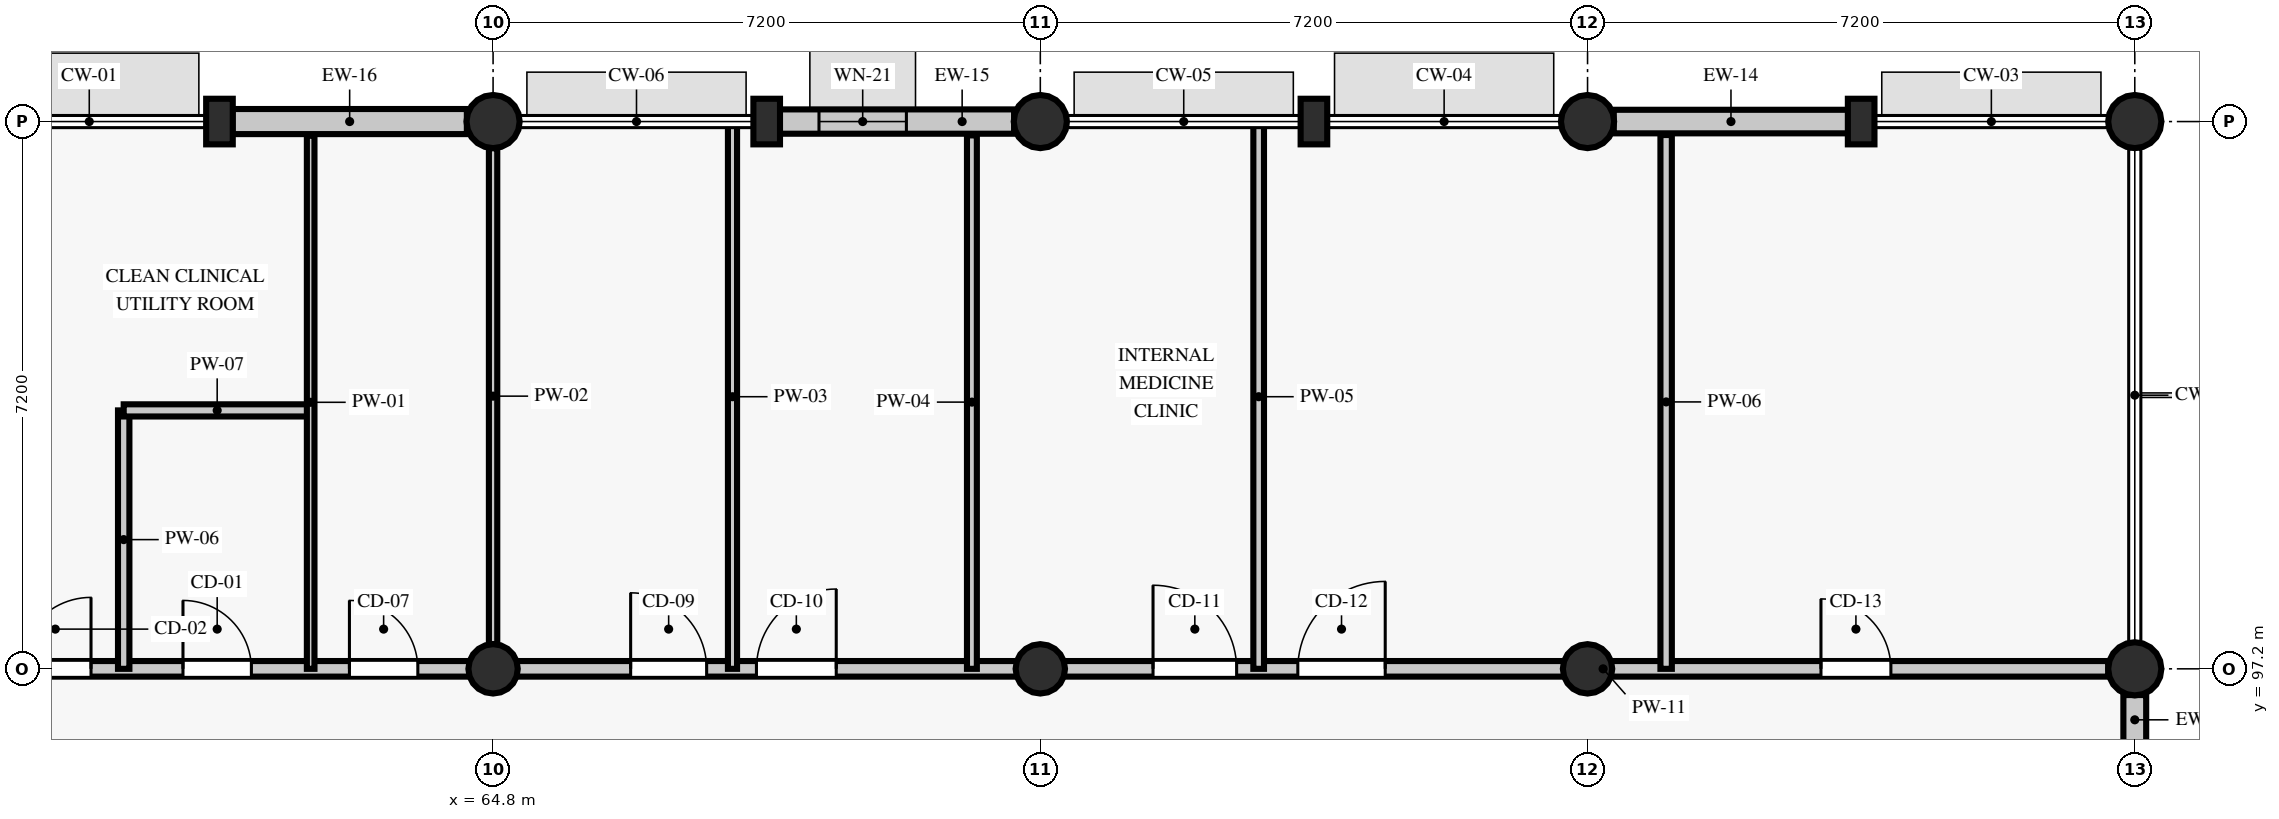
"""IFC4 building model, lengths in metres.
Left out: names, types, materials, properties, quantities, classifications, styles, units other than length and angle.
Written with IfcOpenShell. Run it as: python <this file> out.ifc"""

import sys

from ifc_helpers import new_model, si_unit, direction, frame, frame_2d, origin, origin_2d, place, context, subcontext, project, spatial, rectangle, circle, extrude, element, fill, save


model = new_model("IFC4")
c1 = context("Model", 3, precision=1e-05, world=origin(), true_north=direction((0.0, 1.0)))
c2 = subcontext(c1, "Body", "Model", "MODEL_VIEW")
j1 = project(units=[si_unit("LENGTHUNIT", "METRE"), si_unit("PLANEANGLEUNIT", "RADIAN")], contexts=[c1])
p1 = place(None, origin())
s1 = spatial("IfcSite", under=j1, at=p1, CompositionType="ELEMENT")
p2 = place(p1, origin())
s2 = spatial("IfcBuilding", under=s1, at=p2, CompositionType="ELEMENT")
p3 = place(p2, frame((0.0, 0.0, 4.8)))
s3 = spatial("IfcBuildingStorey", under=s2, at=p3, CompositionType="ELEMENT", Elevation=4.8)
p4 = place(p3, frame((64.8, 97.2, 0.0), z_axis=(0.0, 0.0, 1.0), x_axis=(1.0, 0.0, 0.0)))
e1 = element("IfcColumn", 1, at=p4, inside=s3, PredefinedType="COLUMN", context=c2, shape_type="SweptSolid", body=[
    extrude(circle(Radius=0.325, at=origin_2d()), origin(), (0.0, 0.0, 1.0), 4.555),
])
p5 = place(p3, frame((64.8, 104.4, 0.0), z_axis=(0.0, 0.0, 1.0), x_axis=(1.0, 0.0, 0.0)))
e2 = element("IfcColumn", 2, at=p5, inside=s3, PredefinedType="COLUMN", context=c2, shape_type="SweptSolid", body=[
    extrude(circle(Radius=0.35, at=origin_2d()), origin(), (0.0, 0.0, 1.0), 4.555),
])
p6 = place(p3, frame((72.0, 97.2, 0.0), z_axis=(0.0, 0.0, 1.0), x_axis=(1.0, 0.0, 0.0)))
e3 = element("IfcColumn", 3, at=p6, inside=s3, PredefinedType="COLUMN", context=c2, shape_type="SweptSolid", body=[
    extrude(circle(Radius=0.325, at=origin_2d()), origin(), (0.0, 0.0, 1.0), 4.555),
])
p7 = place(p3, frame((72.0, 104.4, 0.0), z_axis=(0.0, 0.0, 1.0), x_axis=(1.0, 0.0, 0.0)))
e4 = element("IfcColumn", 4, at=p7, inside=s3, PredefinedType="COLUMN", context=c2, shape_type="SweptSolid", body=[
    extrude(circle(Radius=0.35, at=origin_2d()), origin(), (0.0, 0.0, 1.0), 4.555),
])
p8 = place(p3, frame((79.2, 97.2, 0.0), z_axis=(0.0, 0.0, 1.0), x_axis=(1.0, 0.0, 0.0)))
e5 = element("IfcColumn", 5, at=p8, inside=s3, PredefinedType="COLUMN", context=c2, shape_type="SweptSolid", body=[
    extrude(circle(Radius=0.325, at=origin_2d()), origin(), (0.0, 0.0, 1.0), 4.555),
])
for number, where, z_axis, x_axis in (
    (6, (79.2, 104.4, 0.0), (0.0, 0.0, 1.0), (1.0, 0.0, 0.0)),
    (7, (86.4, 97.2, 0.0), (0.0, 0.0, 1.0), (1.0, 0.0, 0.0)),
    (8, (86.4, 104.4, 0.0), (0.0, 0.0, 1.0), (1.0, 0.0, 0.0)),
):
    element("IfcColumn", number, at=place(p3, frame(where, z_axis=z_axis, x_axis=x_axis)), inside=s3, PredefinedType="COLUMN", context=c2, shape_type="SweptSolid", body=[
        extrude(circle(Radius=0.35, at=origin_2d()), origin(), (0.0, 0.0, 1.0), 4.555),
    ])
for number, where, z_axis, x_axis in (
    (9, (61.2, 104.4, 0.0), (0.0, 0.0, 1.0), (1.0, 0.0, 0.0)),
    (10, (68.4, 104.4, 0.0), (0.0, 0.0, 1.0), (1.0, 0.0, 0.0)),
    (11, (75.6, 104.4, 0.0), (0.0, 0.0, 1.0), (1.0, 0.0, 0.0)),
    (12, (82.8, 104.4, 0.0), (0.0, 0.0, 1.0), (1.0, 0.0, 0.0)),
):
    element("IfcColumn", number, at=place(p3, frame(where, z_axis=z_axis, x_axis=x_axis)), inside=s3, PredefinedType="PILASTER", context=c2, shape_type="SweptSolid", body=[
        extrude(rectangle(XDim=0.35, YDim=0.6, at=origin_2d()), origin(), (0.0, 0.0, 1.0), 4.555),
    ])
p9 = place(p3, frame((86.4, 94.502, 0.0), z_axis=(0.0, 0.0, 1.0), x_axis=(0.0, 1.0, 0.0)))
e13 = element("IfcWall", 13, at=p9, inside=s3, PredefinedType="STANDARD", context=c2, shape_type="SweptSolid", body=[
    extrude(rectangle(XDim=2.353, YDim=0.3, at=frame_2d((1.177, 0.0))), origin(), (0.0, 0.0, 1.0), 4.555),
])
p10 = place(p9, frame((0.701, 0.0, 0.9)))
e14 = element("IfcOpeningElement", 14, at=p10, cuts=e13, PredefinedType="OPENING", context=c2, shape_type="SweptSolid", body=[
    extrude(rectangle(XDim=0.95, YDim=1.3, at=frame_2d((0.475, 0.65))), frame((0.0, 0.16, 0.0), z_axis=(0.0, -1.0, 0.0), x_axis=(1.0, 0.0, 0.0)), (0.0, 0.0, 1.0), 0.32),
])
p11 = place(p3, frame((82.629, 104.4, 0.0), z_axis=(0.0, 0.0, 1.0), x_axis=(-1.0, 0.0, 0.0)))
e15 = element("IfcWall", 15, at=p11, inside=s3, PredefinedType="STANDARD", context=c2, shape_type="SweptSolid", body=[
    extrude(rectangle(XDim=3.084, YDim=0.31, at=frame_2d((1.542, 0.0))), origin(), (0.0, 0.0, 1.0), 3.905),
])
p12 = place(p3, frame((71.655, 104.4, 0.0), z_axis=(0.0, 0.0, 1.0), x_axis=(-1.0, 0.0, 0.0)))
e16 = element("IfcWall", 16, at=p12, inside=s3, PredefinedType="STANDARD", context=c2, shape_type="SweptSolid", body=[
    extrude(rectangle(XDim=3.084, YDim=0.32, at=frame_2d((1.542, 0.0))), origin(), (0.0, 0.0, 1.0), 3.905),
])
p13 = place(p12, frame((1.417, 0.0, 0.9)))
e17 = element("IfcOpeningElement", 17, at=p13, cuts=e16, PredefinedType="OPENING", context=c2, shape_type="SweptSolid", body=[
    extrude(rectangle(XDim=1.15, YDim=1.54, at=frame_2d((0.575, 0.77))), frame((0.0, 0.17, 0.0), z_axis=(0.0, -1.0, 0.0), x_axis=(1.0, 0.0, 0.0)), (0.0, 0.0, 1.0), 0.34),
])
p14 = place(p3, frame((64.455, 104.4, 0.0), z_axis=(0.0, 0.0, 1.0), x_axis=(-1.0, 0.0, 0.0)))
e18 = element("IfcWall", 18, at=p14, inside=s3, PredefinedType="STANDARD", context=c2, shape_type="SweptSolid", body=[
    extrude(rectangle(XDim=3.084, YDim=0.33, at=frame_2d((1.542, 0.0))), origin(), (0.0, 0.0, 1.0), 3.905),
])
p15 = place(p3, frame((50.75, 97.2, 0.0), z_axis=(0.0, 0.0, 1.0), x_axis=(1.0, 0.0, 0.0)))
e19 = element("IfcWall", 19, at=p15, inside=s3, PredefinedType="PARTITIONING", context=c2, shape_type="SweptSolid", body=[
    extrude(rectangle(XDim=35.3, YDim=0.205, at=frame_2d((17.65, 0.0))), origin(), (0.0, 0.0, 1.0), 3.805),
])
p16 = place(p15, frame((2.763, 0.0, 0.0)))
e20 = element("IfcOpeningElement", 20, at=p16, cuts=e19, PredefinedType="OPENING", context=c2, shape_type="SweptSolid", body=[
    extrude(rectangle(XDim=1.06, YDim=2.08, at=frame_2d((0.53, 1.04))), frame((0.0, 0.113, 0.0), z_axis=(0.0, -1.0, 0.0), x_axis=(1.0, 0.0, 0.0)), (0.0, 0.0, 1.0), 0.225),
])
p17 = place(p15, frame((7.82, 0.0, 0.0)))
e21 = element("IfcOpeningElement", 21, at=p17, cuts=e19, PredefinedType="OPENING", context=c2, shape_type="SweptSolid", body=[
    extrude(rectangle(XDim=0.94, YDim=2.08, at=frame_2d((0.47, 1.04))), frame((0.0, 0.113, 0.0), z_axis=(0.0, -1.0, 0.0), x_axis=(1.0, 0.0, 0.0)), (0.0, 0.0, 1.0), 0.225),
])
p18 = place(p15, frame((9.97, 0.0, 0.0)))
e22 = element("IfcOpeningElement", 22, at=p18, cuts=e19, PredefinedType="OPENING", context=c2, shape_type="SweptSolid", body=[
    extrude(rectangle(XDim=0.9, YDim=2.08, at=frame_2d((0.45, 1.04))), frame((0.0, 0.113, 0.0), z_axis=(0.0, -1.0, 0.0), x_axis=(1.0, 0.0, 0.0)), (0.0, 0.0, 1.0), 0.225),
])
p19 = place(p15, frame((12.16, 0.0, 0.0)))
e23 = element("IfcOpeningElement", 23, at=p19, cuts=e19, PredefinedType="OPENING", context=c2, shape_type="SweptSolid", body=[
    extrude(rectangle(XDim=0.9, YDim=2.13, at=frame_2d((0.45, 1.065))), frame((0.0, 0.113, 0.0), z_axis=(0.0, -1.0, 0.0), x_axis=(1.0, 0.0, 0.0)), (0.0, 0.0, 1.0), 0.225),
])
p20 = place(p15, frame((15.86, 0.0, 0.0)))
e24 = element("IfcOpeningElement", 24, at=p20, cuts=e19, PredefinedType="OPENING", context=c2, shape_type="SweptSolid", body=[
    extrude(rectangle(XDim=1.0, YDim=2.13, at=frame_2d((0.5, 1.065))), frame((0.0, 0.113, 0.0), z_axis=(0.0, -1.0, 0.0), x_axis=(1.0, 0.0, 0.0)), (0.0, 0.0, 1.0), 0.225),
])
p21 = place(p15, frame((17.515, 0.0, 0.0)))
e25 = element("IfcOpeningElement", 25, at=p21, cuts=e19, PredefinedType="OPENING", context=c2, shape_type="SweptSolid", body=[
    extrude(rectangle(XDim=1.05, YDim=2.13, at=frame_2d((0.525, 1.065))), frame((0.0, 0.113, 0.0), z_axis=(0.0, -1.0, 0.0), x_axis=(1.0, 0.0, 0.0)), (0.0, 0.0, 1.0), 0.225),
])
p22 = place(p15, frame((22.733, 0.0, 0.0)))
e26 = element("IfcOpeningElement", 26, at=p22, cuts=e19, PredefinedType="OPENING", context=c2, shape_type="SweptSolid", body=[
    extrude(rectangle(XDim=1.1, YDim=2.13, at=frame_2d((0.55, 1.065))), frame((0.0, 0.113, 0.0), z_axis=(0.0, -1.0, 0.0), x_axis=(1.0, 0.0, 0.0)), (0.0, 0.0, 1.0), 0.225),
])
p23 = place(p15, frame((24.638, 0.0, 0.0)))
e27 = element("IfcOpeningElement", 27, at=p23, cuts=e19, PredefinedType="OPENING", context=c2, shape_type="SweptSolid", body=[
    extrude(rectangle(XDim=1.15, YDim=2.13, at=frame_2d((0.575, 1.065))), frame((0.0, 0.113, 0.0), z_axis=(0.0, -1.0, 0.0), x_axis=(1.0, 0.0, 0.0)), (0.0, 0.0, 1.0), 0.225),
])
p24 = place(p15, frame((31.521, 0.0, 0.0)))
e28 = element("IfcOpeningElement", 28, at=p24, cuts=e19, PredefinedType="OPENING", context=c2, shape_type="SweptSolid", body=[
    extrude(rectangle(XDim=0.92, YDim=2.18, at=frame_2d((0.46, 1.09))), frame((0.0, 0.113, 0.0), z_axis=(0.0, -1.0, 0.0), x_axis=(1.0, 0.0, 0.0)), (0.0, 0.0, 1.0), 0.225),
])
p25 = place(p3, frame((59.94, 97.2, 0.0), z_axis=(0.0, 0.0, 1.0), x_axis=(0.0, 1.0, 0.0)))
e29 = element("IfcWall", 29, at=p25, inside=s3, PredefinedType="PARTITIONING", context=c2, shape_type="SweptSolid", body=[
    extrude(rectangle(XDim=3.4, YDim=0.15, at=frame_2d((1.7, 0.0))), origin(), (0.0, 0.0, 1.0), 3.805),
])
p26 = place(p3, frame((59.94, 100.6, 0.0), z_axis=(0.0, 0.0, 1.0), x_axis=(1.0, 0.0, 0.0)))
e30 = element("IfcWall", 30, at=p26, inside=s3, PredefinedType="PARTITIONING", context=c2, shape_type="SweptSolid", body=[
    extrude(rectangle(XDim=2.46, YDim=0.16, at=frame_2d((1.23, 0.0))), origin(), (0.0, 0.0, 1.0), 4.055),
])
p27 = place(p3, frame((62.4, 97.2, 0.0), z_axis=(0.0, 0.0, 1.0), x_axis=(0.0, 1.0, 0.0)))
e31 = element("IfcWall", 31, at=p27, inside=s3, PredefinedType="PARTITIONING", context=c2, shape_type="SweptSolid", body=[
    extrude(rectangle(XDim=7.013, YDim=0.1, at=frame_2d((3.506, 0.0))), origin(), (0.0, 0.0, 1.0), 3.805),
])
p28 = place(p3, frame((64.8, 97.525, 0.0), z_axis=(0.0, 0.0, 1.0), x_axis=(0.0, 1.0, 0.0)))
e32 = element("IfcWall", 32, at=p28, inside=s3, PredefinedType="PARTITIONING", context=c2, shape_type="SweptSolid", body=[
    extrude(rectangle(XDim=6.525, YDim=0.11, at=frame_2d((3.263, 0.0))), origin(), (0.0, 0.0, 1.0), 4.005),
])
p29 = place(p3, frame((67.95, 97.2, 0.0), z_axis=(0.0, 0.0, 1.0), x_axis=(0.0, 1.0, 0.0)))
e33 = element("IfcWall", 33, at=p29, inside=s3, PredefinedType="PARTITIONING", context=c2, shape_type="SweptSolid", body=[
    extrude(rectangle(XDim=7.16, YDim=0.12, at=frame_2d((3.58, 0.0))), origin(), (0.0, 0.0, 1.0), 3.805),
])
p30 = place(p3, frame((71.1, 97.2, 0.0), z_axis=(0.0, 0.0, 1.0), x_axis=(0.0, 1.0, 0.0)))
e34 = element("IfcWall", 34, at=p30, inside=s3, PredefinedType="PARTITIONING", context=c2, shape_type="SweptSolid", body=[
    extrude(rectangle(XDim=7.018, YDim=0.13, at=frame_2d((3.509, 0.0))), origin(), (0.0, 0.0, 1.0), 3.805),
])
p31 = place(p3, frame((74.873, 97.2, 0.0), z_axis=(0.0, 0.0, 1.0), x_axis=(0.0, 1.0, 0.0)))
e35 = element("IfcWall", 35, at=p31, inside=s3, PredefinedType="PARTITIONING", context=c2, shape_type="SweptSolid", body=[
    extrude(rectangle(XDim=7.16, YDim=0.14, at=frame_2d((3.58, 0.0))), origin(), (0.0, 0.0, 1.0), 3.805),
])
p32 = place(p3, frame((80.234, 97.2, 0.0), z_axis=(0.0, 0.0, 1.0), x_axis=(0.0, 1.0, 0.0)))
e36 = element("IfcWall", 36, at=p32, inside=s3, PredefinedType="PARTITIONING", context=c2, shape_type="SweptSolid", body=[
    extrude(rectangle(XDim=7.023, YDim=0.15, at=frame_2d((3.511, 0.0))), origin(), (0.0, 0.0, 1.0), 3.805),
])
p33 = place(p13, origin())
e37 = element("IfcWindow", 37, at=p33, inside=s3, PartitioningType="SINGLE_PANEL", PredefinedType="WINDOW", context=c2, shape_type="SweptSolid", body=[
    extrude(rectangle(XDim=1.15, YDim=1.54, at=frame_2d((0.575, 0.77))), frame((0.0, 0.03, 0.0), z_axis=(0.0, -1.0, 0.0), x_axis=(1.0, 0.0, 0.0)), (0.0, 0.0, 1.0), 0.06),
])
fill(e17, e37)
p34 = place(p17, origin())
e38 = element("IfcDoor", 38, at=p34, inside=s3, OperationType="SINGLE_SWING_RIGHT", PredefinedType="DOOR", context=c2, shape_type="SweptSolid", body=[
    extrude(rectangle(XDim=0.94, YDim=2.08, at=frame_2d((0.47, 1.04))), frame((0.0, 0.025, 0.0), z_axis=(0.0, -1.0, 0.0), x_axis=(1.0, 0.0, 0.0)), (0.0, 0.0, 1.0), 0.05),
])
fill(e21, e38)
p35 = place(p18, origin())
e39 = element("IfcDoor", 39, at=p35, inside=s3, OperationType="SINGLE_SWING_LEFT", PredefinedType="DOOR", context=c2, shape_type="SweptSolid", body=[
    extrude(rectangle(XDim=0.9, YDim=2.08, at=frame_2d((0.45, 1.04))), frame((0.0, 0.025, 0.0), z_axis=(0.0, -1.0, 0.0), x_axis=(1.0, 0.0, 0.0)), (0.0, 0.0, 1.0), 0.05),
])
fill(e22, e39)
p36 = place(p19, origin())
e40 = element("IfcDoor", 40, at=p36, inside=s3, OperationType="SINGLE_SWING_LEFT", PredefinedType="DOOR", context=c2, shape_type="SweptSolid", body=[
    extrude(rectangle(XDim=0.9, YDim=2.13, at=frame_2d((0.45, 1.065))), frame((0.0, 0.025, 0.0), z_axis=(0.0, -1.0, 0.0), x_axis=(1.0, 0.0, 0.0)), (0.0, 0.0, 1.0), 0.05),
])
fill(e23, e40)
p37 = place(p20, origin())
e41 = element("IfcDoor", 41, at=p37, inside=s3, OperationType="SINGLE_SWING_LEFT", PredefinedType="DOOR", context=c2, shape_type="SweptSolid", body=[
    extrude(rectangle(XDim=1.0, YDim=2.13, at=frame_2d((0.5, 1.065))), frame((0.0, 0.025, 0.0), z_axis=(0.0, -1.0, 0.0), x_axis=(1.0, 0.0, 0.0)), (0.0, 0.0, 1.0), 0.05),
])
fill(e24, e41)
p38 = place(p21, origin())
e42 = element("IfcDoor", 42, at=p38, inside=s3, OperationType="SINGLE_SWING_RIGHT", PredefinedType="DOOR", context=c2, shape_type="SweptSolid", body=[
    extrude(rectangle(XDim=1.05, YDim=2.13, at=frame_2d((0.525, 1.065))), frame((0.0, 0.025, 0.0), z_axis=(0.0, -1.0, 0.0), x_axis=(1.0, 0.0, 0.0)), (0.0, 0.0, 1.0), 0.05),
])
fill(e25, e42)
p39 = place(p22, origin())
e43 = element("IfcDoor", 43, at=p39, inside=s3, OperationType="SINGLE_SWING_LEFT", PredefinedType="DOOR", context=c2, shape_type="SweptSolid", body=[
    extrude(rectangle(XDim=1.1, YDim=2.13, at=frame_2d((0.55, 1.065))), frame((0.0, 0.025, 0.0), z_axis=(0.0, -1.0, 0.0), x_axis=(1.0, 0.0, 0.0)), (0.0, 0.0, 1.0), 0.05),
])
fill(e26, e43)
p40 = place(p23, origin())
e44 = element("IfcDoor", 44, at=p40, inside=s3, OperationType="SINGLE_SWING_RIGHT", PredefinedType="DOOR", context=c2, shape_type="SweptSolid", body=[
    extrude(rectangle(XDim=1.15, YDim=2.13, at=frame_2d((0.575, 1.065))), frame((0.0, 0.025, 0.0), z_axis=(0.0, -1.0, 0.0), x_axis=(1.0, 0.0, 0.0)), (0.0, 0.0, 1.0), 0.05),
])
fill(e27, e44)
p41 = place(p24, origin())
e45 = element("IfcDoor", 45, at=p41, inside=s3, OperationType="SINGLE_SWING_LEFT", PredefinedType="DOOR", context=c2, shape_type="SweptSolid", body=[
    extrude(rectangle(XDim=0.92, YDim=2.18, at=frame_2d((0.46, 1.09))), frame((0.0, 0.025, 0.0), z_axis=(0.0, -1.0, 0.0), x_axis=(1.0, 0.0, 0.0)), (0.0, 0.0, 1.0), 0.05),
])
fill(e28, e45)
save(model, sys.argv[1])
